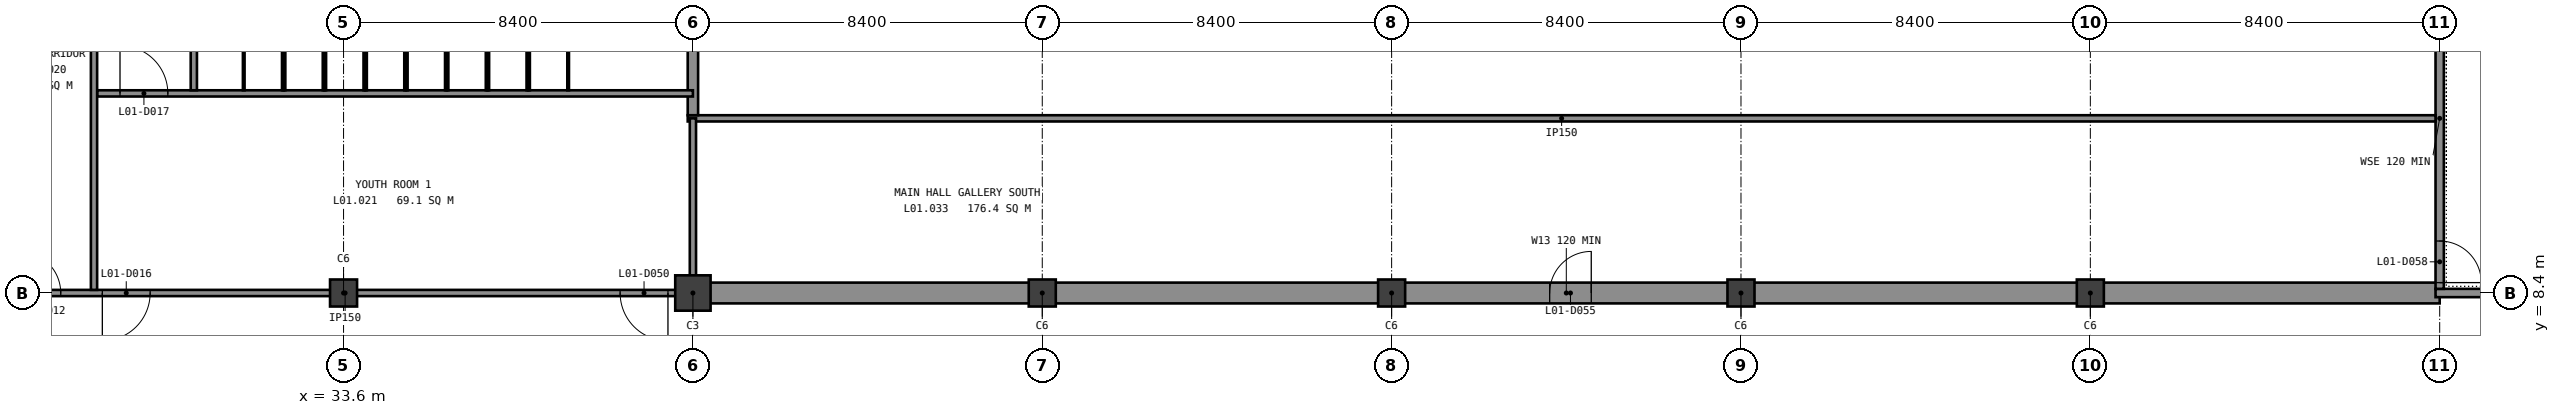
"""IFC4 building model, lengths in metres.
Left out: names, types, materials, properties, quantities, classifications, styles, units other than length and angle.
Written with IfcOpenShell. Run it as: python <this file> out.ifc"""

import sys

from ifc_helpers import new_model, si_unit, direction, frame, frame_2d, origin, origin_2d, place, context, subcontext, project, spatial, rectangle, extrude, element, fill, save


model = new_model("IFC4")
c1 = context("Model", 3, precision=1e-05, world=origin(), true_north=direction((0.0, 1.0)))
c2 = subcontext(c1, "Body", "Model", "MODEL_VIEW")
j1 = project(units=[si_unit("LENGTHUNIT", "METRE"), si_unit("PLANEANGLEUNIT", "RADIAN")], contexts=[c1])
p1 = place(None, origin())
s1 = spatial("IfcSite", under=j1, at=p1, CompositionType="ELEMENT")
p2 = place(p1, origin())
s2 = spatial("IfcBuilding", under=s1, at=p2, CompositionType="ELEMENT")
p3 = place(p2, frame((0.0, 0.0, 5.4)))
s3 = spatial("IfcBuildingStorey", under=s2, at=p3, CompositionType="ELEMENT", Elevation=5.4)
p4 = place(p3, frame((33.6, 8.4, -0.3), z_axis=(0.0, 0.0, 1.0), x_axis=(1.0, 0.0, 0.0)))
e1 = element("IfcColumn", 1, at=p4, inside=s3, PredefinedType="COLUMN", context=c2, shape_type="SweptSolid", body=[
    extrude(rectangle(XDim=0.65, YDim=0.65, at=origin_2d()), origin(), (0.0, 0.0, 1.0), 4.55),
])
p5 = place(p3, frame((42.0, 8.4, -0.3), z_axis=(0.0, 0.0, 1.0), x_axis=(1.0, 0.0, 0.0)))
e2 = element("IfcColumn", 2, at=p5, inside=s3, PredefinedType="COLUMN", context=c2, shape_type="SweptSolid", body=[
    extrude(rectangle(XDim=0.85, YDim=0.85, at=origin_2d()), origin(), (0.0, 0.0, 1.0), 4.55),
])
for number, where, z_axis, x_axis in (
    (3, (50.4, 8.4, -0.3), (0.0, 0.0, 1.0), (1.0, 0.0, 0.0)),
    (4, (58.8, 8.4, -0.3), (0.0, 0.0, 1.0), (1.0, 0.0, 0.0)),
    (5, (67.2, 8.4, -0.3), (0.0, 0.0, 1.0), (1.0, 0.0, 0.0)),
    (6, (75.6, 8.4, -0.3), (0.0, 0.0, 1.0), (1.0, 0.0, 0.0)),
):
    element("IfcColumn", number, at=place(p3, frame(where, z_axis=z_axis, x_axis=x_axis)), inside=s3, PredefinedType="COLUMN", context=c2, shape_type="SweptSolid", body=[
        extrude(rectangle(XDim=0.65, YDim=0.65, at=origin_2d()), origin(), (0.0, 0.0, 1.0), 4.55),
    ])
p6 = place(p3, frame((42.0, 8.4, -0.3), z_axis=(0.0, 0.0, 1.0), x_axis=(1.0, 0.0, 0.0)))
e7 = element("IfcWall", 7, at=p6, inside=s3, PredefinedType="SHEAR", context=c2, shape_type="SweptSolid", body=[
    extrude(rectangle(XDim=42.0, YDim=0.5, at=frame_2d((21.0, 0.0))), origin(), (0.0, 0.0, 1.0), 4.55),
])
p7 = place(p6, frame((20.6, 0.0, 0.3)))
e8 = element("IfcOpeningElement", 8, at=p7, cuts=e7, PredefinedType="OPENING", context=c2, shape_type="SweptSolid", body=[
    extrude(rectangle(XDim=1.0, YDim=2.1, at=frame_2d((0.5, 1.05))), frame((0.0, 0.26, 0.0), z_axis=(0.0, -1.0, 0.0), x_axis=(1.0, 0.0, 0.0)), (0.0, 0.0, 1.0), 0.52),
])
p8 = place(p3, frame((83.9, 8.4, -0.3), z_axis=(0.0, 0.0, 1.0), x_axis=(1.0, 0.0, 0.0)))
e9 = element("IfcWall", 9, at=p8, inside=s3, PredefinedType="SHEAR", context=c2, shape_type="SweptSolid", body=[
    extrude(rectangle(XDim=4.4, YDim=0.2, at=frame_2d((2.2, 0.0))), origin(), (0.0, 0.0, 1.0), 4.5),
])
p9 = place(p8, frame((1.15, 0.0, 0.3)))
e10 = element("IfcOpeningElement", 10, at=p9, cuts=e9, PredefinedType="OPENING", context=c2, shape_type="SweptSolid", body=[
    extrude(rectangle(XDim=2.1, YDim=2.1, at=frame_2d((1.05, 1.05))), frame((0.0, 0.11, 0.0), z_axis=(0.0, -1.0, 0.0), x_axis=(1.0, 0.0, 0.0)), (0.0, 0.0, 1.0), 0.22),
])
p10 = place(p3, frame((84.0, 8.5, -0.3), z_axis=(0.0, 0.0, 1.0), x_axis=(0.0, 1.0, 0.0)))
e11 = element("IfcWall", 11, at=p10, inside=s3, PredefinedType="SHEAR", context=c2, shape_type="SweptSolid", body=[
    extrude(rectangle(XDim=8.2, YDim=0.2, at=frame_2d((4.1, 0.0))), origin(), (0.0, 0.0, 1.0), 4.5),
])
p11 = place(p10, frame((0.15, 0.0, 0.3)))
e12 = element("IfcOpeningElement", 12, at=p11, cuts=e11, PredefinedType="OPENING", context=c2, shape_type="SweptSolid", body=[
    extrude(rectangle(XDim=1.0, YDim=2.1, at=frame_2d((0.5, 1.05))), frame((0.0, 0.11, 0.0), z_axis=(0.0, -1.0, 0.0), x_axis=(1.0, 0.0, 0.0)), (0.0, 0.0, 1.0), 0.22),
])
p12 = place(p3, frame((41.875, 12.6, -0.3), z_axis=(0.0, 0.0, 1.0), x_axis=(1.0, 0.0, 0.0)))
e13 = element("IfcWall", 13, at=p12, inside=s3, PredefinedType="PARTITIONING", context=c2, shape_type="SweptSolid", body=[
    extrude(rectangle(XDim=42.025, YDim=0.15, at=frame_2d((21.012, 0.0))), origin(), (0.0, 0.0, 1.0), 4.5),
])
p13 = place(p3, frame((42.0, 12.675, -0.3), z_axis=(0.0, 0.0, 1.0), x_axis=(0.0, 1.0, 0.0)))
e14 = element("IfcWall", 14, at=p13, inside=s3, PredefinedType="SOLIDWALL", context=c2, shape_type="SweptSolid", body=[
    extrude(rectangle(XDim=12.425, YDim=0.25, at=frame_2d((6.212, 0.0))), origin(), (0.0, 0.0, 1.0), 3.9),
])
p14 = place(p3, frame((25.2, 8.4, 0.0), z_axis=(0.0, 0.0, 1.0), x_axis=(1.0, 0.0, 0.0)))
e15 = element("IfcWall", 15, at=p14, inside=s3, PredefinedType="PARTITIONING", context=c2, shape_type="SweptSolid", body=[
    extrude(rectangle(XDim=16.875, YDim=0.15, at=frame_2d((8.438, 0.0))), origin(), (0.0, 0.0, 1.0), 3.5),
])
p15 = place(p14, frame((2.6, 0.0, 0.0)))
e16 = element("IfcOpeningElement", 16, at=p15, cuts=e15, PredefinedType="OPENING", context=c2, shape_type="SweptSolid", body=[
    extrude(rectangle(XDim=1.15, YDim=2.1, at=frame_2d((0.575, 1.05))), frame((0.0, 0.085, 0.0), z_axis=(0.0, -1.0, 0.0), x_axis=(1.0, 0.0, 0.0)), (0.0, 0.0, 1.0), 0.17),
])
p16 = place(p14, frame((15.05, 0.0, 0.0)))
e17 = element("IfcOpeningElement", 17, at=p16, cuts=e15, PredefinedType="OPENING", context=c2, shape_type="SweptSolid", body=[
    extrude(rectangle(XDim=1.15, YDim=2.1, at=frame_2d((0.575, 1.05))), frame((0.0, 0.085, 0.0), z_axis=(0.0, -1.0, 0.0), x_axis=(1.0, 0.0, 0.0)), (0.0, 0.0, 1.0), 0.17),
])
p17 = place(p14, frame((0.6, 0.0, 0.0)))
e18 = element("IfcOpeningElement", 18, at=p17, cuts=e15, PredefinedType="OPENING", context=c2, shape_type="SweptSolid", body=[
    extrude(rectangle(XDim=1.0, YDim=2.1, at=frame_2d((0.5, 1.05))), frame((0.0, 0.085, 0.0), z_axis=(0.0, -1.0, 0.0), x_axis=(1.0, 0.0, 0.0)), (0.0, 0.0, 1.0), 0.17),
])
p18 = place(p3, frame((27.675, 13.2, 0.0), z_axis=(0.0, 0.0, 1.0), x_axis=(1.0, 0.0, 0.0)))
e19 = element("IfcWall", 19, at=p18, inside=s3, PredefinedType="PARTITIONING", context=c2, shape_type="SweptSolid", body=[
    extrude(rectangle(XDim=14.325, YDim=0.15, at=frame_2d((7.163, 0.0))), origin(), (0.0, 0.0, 1.0), 4.2),
])
p19 = place(p18, frame((0.55, 0.0, 0.0)))
e20 = element("IfcOpeningElement", 20, at=p19, cuts=e19, PredefinedType="OPENING", context=c2, shape_type="SweptSolid", body=[
    extrude(rectangle(XDim=1.15, YDim=2.1, at=frame_2d((0.575, 1.05))), frame((0.0, 0.085, 0.0), z_axis=(0.0, -1.0, 0.0), x_axis=(1.0, 0.0, 0.0)), (0.0, 0.0, 1.0), 0.17),
])
p20 = place(p3, frame((27.6, 8.475, 0.0), z_axis=(0.0, 0.0, 1.0), x_axis=(0.0, 1.0, 0.0)))
e21 = element("IfcWall", 21, at=p20, inside=s3, PredefinedType="PARTITIONING", context=c2, shape_type="SweptSolid", body=[
    extrude(rectangle(XDim=16.825, YDim=0.15, at=frame_2d((8.413, 0.0))), origin(), (0.0, 0.0, 1.0), 4.2),
])
p21 = place(p20, frame((10.125, 0.0, 0.0)))
e22 = element("IfcOpeningElement", 22, at=p21, cuts=e21, PredefinedType="OPENING", context=c2, shape_type="SweptSolid", body=[
    extrude(rectangle(XDim=1.0, YDim=2.1, at=frame_2d((0.5, 1.05))), frame((0.0, 0.085, 0.0), z_axis=(0.0, -1.0, 0.0), x_axis=(1.0, 0.0, 0.0)), (0.0, 0.0, 1.0), 0.17),
])
p22 = place(p3, frame((30.0, 13.275, 0.0), z_axis=(0.0, 0.0, 1.0), x_axis=(0.0, 1.0, 0.0)))
e23 = element("IfcWall", 23, at=p22, inside=s3, PredefinedType="PARTITIONING", context=c2, shape_type="SweptSolid", body=[
    extrude(rectangle(XDim=11.825, YDim=0.15, at=frame_2d((5.913, 0.0))), origin(), (0.0, 0.0, 1.0), 4.2),
])
p23 = place(p22, frame((1.875, 0.0, 0.0)))
e24 = element("IfcOpeningElement", 24, at=p23, cuts=e23, PredefinedType="OPENING", context=c2, shape_type="SweptSolid", body=[
    extrude(rectangle(XDim=0.9, YDim=2.1, at=frame_2d((0.45, 1.05))), frame((0.0, 0.085, 0.0), z_axis=(0.0, -1.0, 0.0), x_axis=(1.0, 0.0, 0.0)), (0.0, 0.0, 1.0), 0.17),
])
p24 = place(p22, frame((6.575, 0.0, 0.0)))
e25 = element("IfcOpeningElement", 25, at=p24, cuts=e23, PredefinedType="OPENING", context=c2, shape_type="SweptSolid", body=[
    extrude(rectangle(XDim=0.9, YDim=2.1, at=frame_2d((0.45, 1.05))), frame((0.0, 0.085, 0.0), z_axis=(0.0, -1.0, 0.0), x_axis=(1.0, 0.0, 0.0)), (0.0, 0.0, 1.0), 0.17),
])
p25 = place(p22, frame((10.1, 0.0, 0.0)))
e26 = element("IfcOpeningElement", 26, at=p25, cuts=e23, PredefinedType="OPENING", context=c2, shape_type="SweptSolid", body=[
    extrude(rectangle(XDim=1.05, YDim=2.25, at=frame_2d((0.525, 1.125))), frame((0.0, 0.085, 0.0), z_axis=(0.0, -1.0, 0.0), x_axis=(1.0, 0.0, 0.0)), (0.0, 0.0, 1.0), 0.17),
])
p26 = place(p3, frame((42.0, 8.65, 0.0), z_axis=(0.0, 0.0, 1.0), x_axis=(0.0, 1.0, 0.0)))
e27 = element("IfcWall", 27, at=p26, inside=s3, PredefinedType="PARTITIONING", context=c2, shape_type="SweptSolid", body=[
    extrude(rectangle(XDim=3.95, YDim=0.15, at=frame_2d((1.975, 0.0))), origin(), (0.0, 0.0, 1.0), 3.6),
])
for number, where, z_axis, x_axis in (
    (28, (31.2, 13.275, 0.0), (0.0, 0.0, 1.0), (0.0, 1.0, 0.0)),
    (29, (32.14, 13.275, 0.0), (0.0, 0.0, 1.0), (0.0, 1.0, 0.0)),
    (30, (32.18, 13.275, 0.0), (0.0, 0.0, 1.0), (0.0, 1.0, 0.0)),
    (31, (33.12, 13.275, 0.0), (0.0, 0.0, 1.0), (0.0, 1.0, 0.0)),
    (32, (33.16, 13.275, 0.0), (0.0, 0.0, 1.0), (0.0, 1.0, 0.0)),
    (33, (34.1, 13.275, 0.0), (0.0, 0.0, 1.0), (0.0, 1.0, 0.0)),
    (34, (34.14, 13.275, 0.0), (0.0, 0.0, 1.0), (0.0, 1.0, 0.0)),
    (35, (35.08, 13.275, 0.0), (0.0, 0.0, 1.0), (0.0, 1.0, 0.0)),
    (36, (35.12, 13.275, 0.0), (0.0, 0.0, 1.0), (0.0, 1.0, 0.0)),
    (37, (36.06, 13.275, 0.0), (0.0, 0.0, 1.0), (0.0, 1.0, 0.0)),
    (38, (36.1, 13.275, 0.0), (0.0, 0.0, 1.0), (0.0, 1.0, 0.0)),
    (39, (37.04, 13.275, 0.0), (0.0, 0.0, 1.0), (0.0, 1.0, 0.0)),
    (40, (37.08, 13.275, 0.0), (0.0, 0.0, 1.0), (0.0, 1.0, 0.0)),
    (41, (38.02, 13.275, 0.0), (0.0, 0.0, 1.0), (0.0, 1.0, 0.0)),
    (42, (38.06, 13.275, 0.0), (0.0, 0.0, 1.0), (0.0, 1.0, 0.0)),
    (43, (39.0, 13.275, 0.0), (0.0, 0.0, 1.0), (0.0, 1.0, 0.0)),
):
    element("IfcWall", number, at=place(p3, frame(where, z_axis=z_axis, x_axis=x_axis)), inside=s3, PredefinedType="PARTITIONING", context=c2, shape_type="SweptSolid", body=[
        extrude(rectangle(XDim=1.595, YDim=0.04, at=frame_2d((0.798, 0.0))), origin(), (0.0, 0.0, 1.0), 2.0),
    ])
p27 = place(p11, origin())
e44 = element("IfcDoor", 44, at=p27, inside=s3, OperationType="SINGLE_SWING_LEFT", PredefinedType="DOOR", context=c2, shape_type="SweptSolid", body=[
    extrude(rectangle(XDim=1.0, YDim=2.1, at=frame_2d((0.5, 1.05))), frame((0.0, 0.025, 0.0), z_axis=(0.0, -1.0, 0.0), x_axis=(1.0, 0.0, 0.0)), (0.0, 0.0, 1.0), 0.05),
])
fill(e12, e44)
p28 = place(p15, origin())
e45 = element("IfcDoor", 45, at=p28, inside=s3, OperationType="SINGLE_SWING_LEFT", PredefinedType="DOOR", context=c2, shape_type="SweptSolid", body=[
    extrude(rectangle(XDim=1.15, YDim=2.1, at=frame_2d((0.575, 1.05))), frame((0.0, 0.025, 0.0), z_axis=(0.0, -1.0, 0.0), x_axis=(1.0, 0.0, 0.0)), (0.0, 0.0, 1.0), 0.05),
])
fill(e16, e45)
p29 = place(p16, origin())
e46 = element("IfcDoor", 46, at=p29, inside=s3, OperationType="SINGLE_SWING_RIGHT", PredefinedType="DOOR", context=c2, shape_type="SweptSolid", body=[
    extrude(rectangle(XDim=1.15, YDim=2.1, at=frame_2d((0.575, 1.05))), frame((0.0, 0.025, 0.0), z_axis=(0.0, -1.0, 0.0), x_axis=(1.0, 0.0, 0.0)), (0.0, 0.0, 1.0), 0.05),
])
fill(e17, e46)
p30 = place(p19, origin())
e47 = element("IfcDoor", 47, at=p30, inside=s3, OperationType="SINGLE_SWING_RIGHT", PredefinedType="DOOR", context=c2, shape_type="SweptSolid", body=[
    extrude(rectangle(XDim=1.15, YDim=2.1, at=frame_2d((0.575, 1.05))), frame((0.0, 0.025, 0.0), z_axis=(0.0, -1.0, 0.0), x_axis=(1.0, 0.0, 0.0)), (0.0, 0.0, 1.0), 0.05),
])
fill(e20, e47)
p31 = place(p17, origin())
e48 = element("IfcDoor", 48, at=p31, inside=s3, OperationType="SINGLE_SWING_RIGHT", PredefinedType="DOOR", context=c2, shape_type="SweptSolid", body=[
    extrude(rectangle(XDim=1.0, YDim=2.1, at=frame_2d((0.5, 1.05))), frame((0.0, 0.025, 0.0), z_axis=(0.0, -1.0, 0.0), x_axis=(1.0, 0.0, 0.0)), (0.0, 0.0, 1.0), 0.05),
])
fill(e18, e48)
p32 = place(p7, origin())
e49 = element("IfcDoor", 49, at=p32, inside=s3, OperationType="SINGLE_SWING_LEFT", PredefinedType="DOOR", context=c2, shape_type="SweptSolid", body=[
    extrude(rectangle(XDim=1.0, YDim=2.1, at=frame_2d((0.5, 1.05))), frame((0.0, 0.025, 0.0), z_axis=(0.0, -1.0, 0.0), x_axis=(1.0, 0.0, 0.0)), (0.0, 0.0, 1.0), 0.05),
])
fill(e8, e49)
save(model, sys.argv[1])
